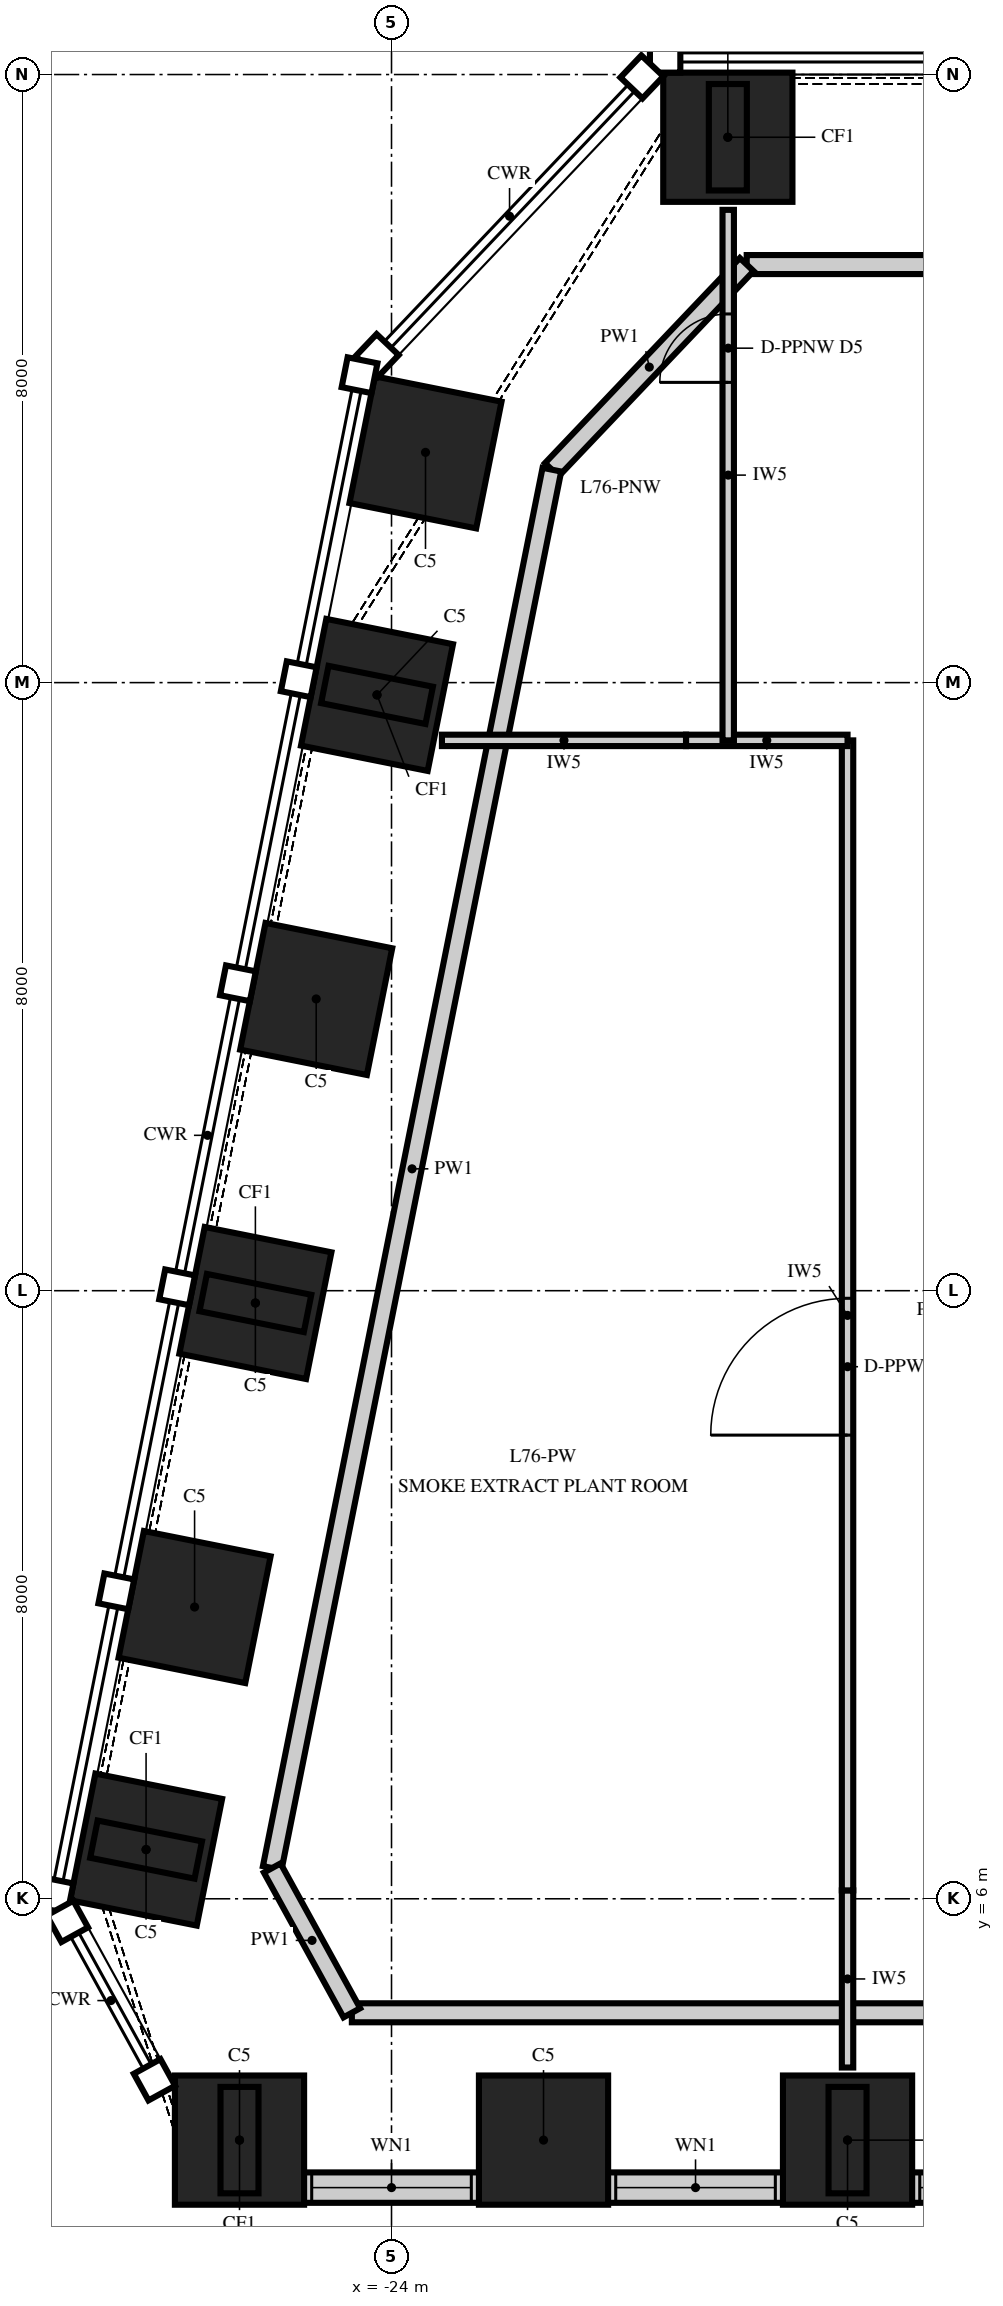
"""IFC4 building model, lengths in metres.
Left out: names, types, materials, properties, quantities, classifications, styles, units other than length and angle.
Written with IfcOpenShell. Run it as: python <this file> out.ifc"""

import sys

from ifc_helpers import new_model, si_unit, direction, frame, frame_2d, origin, origin_2d, place, context, subcontext, project, spatial, rectangle, hollow_rectangle, extrude, element, fill, save


model = new_model("IFC4")
c1 = context("Model", 3, precision=1e-05, world=origin(), true_north=direction((0.0, 1.0)))
c2 = subcontext(c1, "Body", "Model", "MODEL_VIEW")
j1 = project(units=[si_unit("LENGTHUNIT", "METRE"), si_unit("PLANEANGLEUNIT", "RADIAN")], contexts=[c1])
p1 = place(None, origin())
s1 = spatial("IfcSite", under=j1, at=p1, CompositionType="ELEMENT")
p2 = place(p1, origin())
s2 = spatial("IfcBuilding", under=s1, at=p2, CompositionType="ELEMENT")
p3 = place(p2, frame((0.0, 0.0, 324.0)))
s3 = spatial("IfcBuildingStorey", under=s2, at=p3, CompositionType="ELEMENT", Elevation=324.0)
for number, where, z_axis, x_axis in (
    (1, (-26.0, 2.825, 0.0), (0.0, 0.0, 1.0), (1.0, 0.0, 0.0)),
    (2, (-22.0, 2.825, 0.0), (0.0, 0.0, 1.0), (1.0, 0.0, 0.0)),
    (3, (-18.0, 2.825, 0.0), (0.0, 0.0, 1.0), (1.0, 0.0, 0.0)),
    (4, (-19.575, 29.175, 0.0), (0.0, 0.0, 1.0), (-1.0, 0.0, 0.0)),
    (5, (-23.553, 25.029, 0.0), (0.0, 0.0, 1.0), (-0.196, -0.981, 0.0)),
    (6, (-24.191, 21.838, 0.0), (0.0, 0.0, 1.0), (-0.196, -0.981, 0.0)),
    (7, (-24.991, 17.838, 0.0), (0.0, 0.0, 1.0), (-0.196, -0.981, 0.0)),
    (8, (-25.791, 13.838, 0.0), (0.0, 0.0, 1.0), (-0.196, -0.981, 0.0)),
    (9, (-26.591, 9.838, 0.0), (0.0, 0.0, 1.0), (-0.196, -0.981, 0.0)),
    (10, (-27.229, 6.647, 0.0), (0.0, 0.0, 1.0), (-0.196, -0.981, 0.0)),
):
    element("IfcColumn", number, at=place(p3, frame(where, z_axis=z_axis, x_axis=x_axis)), inside=s3, PredefinedType="COLUMN", context=c2, shape_type="SweptSolid", body=[
        extrude(rectangle(XDim=1.7, YDim=1.7, at=origin_2d()), origin(), (0.0, 0.0, 1.0), 6.0),
    ])
for number, where, z_axis, x_axis in (
    (11, (-26.0, 2.825, 6.0), (0.0, 0.0, 1.0), (1.0, 0.0, 0.0)),
    (12, (-18.0, 2.825, 6.0), (0.0, 0.0, 1.0), (1.0, 0.0, 0.0)),
    (13, (-19.575, 29.175, 6.0), (0.0, 0.0, 1.0), (-1.0, 0.0, 0.0)),
    (14, (-24.191, 21.838, 6.0), (0.0, 0.0, 1.0), (-0.196, -0.981, 0.0)),
    (15, (-25.791, 13.838, 6.0), (0.0, 0.0, 1.0), (-0.196, -0.981, 0.0)),
    (16, (-27.229, 6.647, 6.0), (0.0, 0.0, 1.0), (-0.196, -0.981, 0.0)),
):
    element("IfcColumn", number, at=place(p3, frame(where, z_axis=z_axis, x_axis=x_axis)), inside=s3, PredefinedType="COLUMN", context=c2, shape_type="SweptSolid", body=[
        extrude(hollow_rectangle(XDim=0.5, YDim=1.4, WallThickness=0.04, at=origin_2d()), origin(), (0.0, 0.0, 1.0), 24.0),
    ])
p4 = place(p3, frame((-26.0, 2.2, 0.0), z_axis=(0.0, 0.0, 1.0), x_axis=(1.0, 0.0, 0.0)))
e17 = element("IfcWall", 17, at=p4, inside=s3, PredefinedType="SOLIDWALL", context=c2, shape_type="SweptSolid", body=[
    extrude(rectangle(XDim=52.0, YDim=0.4, at=frame_2d((26.0, 0.0))), origin(), (0.0, 0.0, 1.0), 4.0),
])
p5 = place(p4, frame((0.95, 0.0, 0.8)))
e18 = element("IfcOpeningElement", 18, at=p5, cuts=e17, PredefinedType="OPENING", context=c2, shape_type="SweptSolid", body=[
    extrude(rectangle(XDim=2.1, YDim=1.15, at=frame_2d((1.05, 0.575))), frame((0.0, 0.215, 0.0), z_axis=(0.0, -1.0, 0.0), x_axis=(1.0, 0.0, 0.0)), (0.0, 0.0, 1.0), 0.43),
])
p6 = place(p4, frame((4.95, 0.0, 0.8)))
e19 = element("IfcOpeningElement", 19, at=p6, cuts=e17, PredefinedType="OPENING", context=c2, shape_type="SweptSolid", body=[
    extrude(rectangle(XDim=2.1, YDim=1.15, at=frame_2d((1.05, 0.575))), frame((0.0, 0.215, 0.0), z_axis=(0.0, -1.0, 0.0), x_axis=(1.0, 0.0, 0.0)), (0.0, 0.0, 1.0), 0.43),
])
p7 = place(p4, frame((8.95, 0.0, 0.8)))
e20 = element("IfcOpeningElement", 20, at=p7, cuts=e17, PredefinedType="OPENING", context=c2, shape_type="SweptSolid", body=[
    extrude(rectangle(XDim=2.1, YDim=1.15, at=frame_2d((1.05, 0.575))), frame((0.0, 0.215, 0.0), z_axis=(0.0, -1.0, 0.0), x_axis=(1.0, 0.0, 0.0)), (0.0, 0.0, 1.0), 0.43),
])
p8 = place(p4, frame((12.95, 0.0, 0.8)))
e21 = element("IfcOpeningElement", 21, at=p8, cuts=e17, PredefinedType="OPENING", context=c2, shape_type="SweptSolid", body=[
    extrude(rectangle(XDim=2.1, YDim=1.15, at=frame_2d((1.05, 0.575))), frame((0.0, 0.215, 0.0), z_axis=(0.0, -1.0, 0.0), x_axis=(1.0, 0.0, 0.0)), (0.0, 0.0, 1.0), 0.43),
])
p9 = place(p4, frame((16.95, 0.0, 0.8)))
e22 = element("IfcOpeningElement", 22, at=p9, cuts=e17, PredefinedType="OPENING", context=c2, shape_type="SweptSolid", body=[
    extrude(rectangle(XDim=2.1, YDim=1.15, at=frame_2d((1.05, 0.575))), frame((0.0, 0.215, 0.0), z_axis=(0.0, -1.0, 0.0), x_axis=(1.0, 0.0, 0.0)), (0.0, 0.0, 1.0), 0.43),
])
p10 = place(p4, frame((20.95, 0.0, 0.8)))
e23 = element("IfcOpeningElement", 23, at=p10, cuts=e17, PredefinedType="OPENING", context=c2, shape_type="SweptSolid", body=[
    extrude(rectangle(XDim=2.1, YDim=1.15, at=frame_2d((1.05, 0.575))), frame((0.0, 0.215, 0.0), z_axis=(0.0, -1.0, 0.0), x_axis=(1.0, 0.0, 0.0)), (0.0, 0.0, 1.0), 0.43),
])
p11 = place(p4, frame((24.95, 0.0, 0.8)))
e24 = element("IfcOpeningElement", 24, at=p11, cuts=e17, PredefinedType="OPENING", context=c2, shape_type="SweptSolid", body=[
    extrude(rectangle(XDim=2.1, YDim=1.15, at=frame_2d((1.05, 0.575))), frame((0.0, 0.215, 0.0), z_axis=(0.0, -1.0, 0.0), x_axis=(1.0, 0.0, 0.0)), (0.0, 0.0, 1.0), 0.43),
])
p12 = place(p4, frame((28.95, 0.0, 0.8)))
e25 = element("IfcOpeningElement", 25, at=p12, cuts=e17, PredefinedType="OPENING", context=c2, shape_type="SweptSolid", body=[
    extrude(rectangle(XDim=2.1, YDim=1.15, at=frame_2d((1.05, 0.575))), frame((0.0, 0.215, 0.0), z_axis=(0.0, -1.0, 0.0), x_axis=(1.0, 0.0, 0.0)), (0.0, 0.0, 1.0), 0.43),
])
p13 = place(p4, frame((32.95, 0.0, 0.8)))
e26 = element("IfcOpeningElement", 26, at=p13, cuts=e17, PredefinedType="OPENING", context=c2, shape_type="SweptSolid", body=[
    extrude(rectangle(XDim=2.1, YDim=1.15, at=frame_2d((1.05, 0.575))), frame((0.0, 0.215, 0.0), z_axis=(0.0, -1.0, 0.0), x_axis=(1.0, 0.0, 0.0)), (0.0, 0.0, 1.0), 0.43),
])
p14 = place(p4, frame((36.95, 0.0, 0.8)))
e27 = element("IfcOpeningElement", 27, at=p14, cuts=e17, PredefinedType="OPENING", context=c2, shape_type="SweptSolid", body=[
    extrude(rectangle(XDim=2.1, YDim=1.15, at=frame_2d((1.05, 0.575))), frame((0.0, 0.215, 0.0), z_axis=(0.0, -1.0, 0.0), x_axis=(1.0, 0.0, 0.0)), (0.0, 0.0, 1.0), 0.43),
])
p15 = place(p4, frame((40.95, 0.0, 0.8)))
e28 = element("IfcOpeningElement", 28, at=p15, cuts=e17, PredefinedType="OPENING", context=c2, shape_type="SweptSolid", body=[
    extrude(rectangle(XDim=2.1, YDim=1.15, at=frame_2d((1.05, 0.575))), frame((0.0, 0.215, 0.0), z_axis=(0.0, -1.0, 0.0), x_axis=(1.0, 0.0, 0.0)), (0.0, 0.0, 1.0), 0.43),
])
p16 = place(p4, frame((44.95, 0.0, 0.8)))
e29 = element("IfcOpeningElement", 29, at=p16, cuts=e17, PredefinedType="OPENING", context=c2, shape_type="SweptSolid", body=[
    extrude(rectangle(XDim=2.1, YDim=1.15, at=frame_2d((1.05, 0.575))), frame((0.0, 0.215, 0.0), z_axis=(0.0, -1.0, 0.0), x_axis=(1.0, 0.0, 0.0)), (0.0, 0.0, 1.0), 0.43),
])
p17 = place(p4, frame((48.95, 0.0, 0.8)))
e30 = element("IfcOpeningElement", 30, at=p17, cuts=e17, PredefinedType="OPENING", context=c2, shape_type="SweptSolid", body=[
    extrude(rectangle(XDim=2.1, YDim=1.15, at=frame_2d((1.05, 0.575))), frame((0.0, 0.215, 0.0), z_axis=(0.0, -1.0, 0.0), x_axis=(1.0, 0.0, 0.0)), (0.0, 0.0, 1.0), 0.43),
])
p18 = place(p3, frame((-24.522, 4.5, 6.0), z_axis=(0.0, 0.0, 1.0), x_axis=(1.0, 0.0, 0.0)))
e31 = element("IfcWall", 31, at=p18, inside=s3, PredefinedType="PARAPET", context=c2, shape_type="SweptSolid", body=[
    extrude(rectangle(XDim=49.043, YDim=0.25, at=frame_2d((24.522, 0.0))), origin(), (0.0, 0.0, 1.0), 1.1),
])
p19 = place(p3, frame((19.327, 27.5, 6.0), z_axis=(0.0, 0.0, 1.0), x_axis=(-1.0, 0.0, 0.0)))
e32 = element("IfcWall", 32, at=p19, inside=s3, PredefinedType="PARAPET", context=c2, shape_type="SweptSolid", body=[
    extrude(rectangle(XDim=38.653, YDim=0.25, at=frame_2d((19.327, 0.0))), origin(), (0.0, 0.0, 1.0), 1.1),
])
p20 = place(p3, frame((-19.327, 27.5, 6.0), z_axis=(0.0, 0.0, 1.0), x_axis=(-0.688770149305, -0.724979780012, 0.0)))
e33 = element("IfcWall", 33, at=p20, inside=s3, PredefinedType="PARAPET", context=c2, shape_type="SweptSolid", body=[
    extrude(rectangle(XDim=3.722, YDim=0.25, at=frame_2d((1.861, 0.0))), origin(), (0.0, 0.0, 1.0), 1.1),
])
p21 = place(p3, frame((-21.89, 24.802, 6.0), z_axis=(0.0, 0.0, 1.0), x_axis=(-0.196118637634, -0.980580175188, 0.0)))
e34 = element("IfcWall", 34, at=p21, inside=s3, PredefinedType="PARAPET", context=c2, shape_type="SweptSolid", body=[
    extrude(rectangle(XDim=18.761, YDim=0.25, at=frame_2d((9.381, 0.0))), origin(), (0.0, 0.0, 1.0), 1.1),
])
p22 = place(p3, frame((-25.57, 6.405, 6.0), z_axis=(0.0, 0.0, 1.0), x_axis=(0.481996345575, -0.876173226509, 0.0)))
e35 = element("IfcWall", 35, at=p22, inside=s3, PredefinedType="PARAPET", context=c2, shape_type="SweptSolid", body=[
    extrude(rectangle(XDim=2.174, YDim=0.25, at=frame_2d((1.087, 0.0))), origin(), (0.0, 0.0, 1.0), 1.1),
])
p23 = place(p3, frame((-18.0, 3.78, 0.0), z_axis=(0.0, 0.0, 1.0), x_axis=(0.0, 1.0, 0.0)))
e36 = element("IfcWall", 36, at=p23, inside=s3, PredefinedType="PARTITIONING", context=c2, shape_type="SweptSolid", body=[
    extrude(rectangle(XDim=2.33, YDim=0.15, at=frame_2d((1.165, 0.0))), origin(), (0.0, 0.0, 1.0), 5.13),
])
p24 = place(p3, frame((-18.0, 6.11, 0.0), z_axis=(0.0, 0.0, 1.0), x_axis=(0.0, 1.0, 0.0)))
e37 = element("IfcWall", 37, at=p24, inside=s3, PredefinedType="PARTITIONING", context=c2, shape_type="SweptSolid", body=[
    extrude(rectangle(XDim=15.13, YDim=0.15, at=frame_2d((7.565, 0.0))), origin(), (0.0, 0.0, 1.0), 5.75),
])
p25 = place(p24, frame((5.99, 0.0, 0.0)))
e38 = element("IfcOpeningElement", 38, at=p25, cuts=e37, PredefinedType="OPENING", context=c2, shape_type="SweptSolid", body=[
    extrude(rectangle(XDim=1.8, YDim=2.4, at=frame_2d((0.9, 1.2))), frame((0.0, 0.09, 0.0), z_axis=(0.0, -1.0, 0.0), x_axis=(1.0, 0.0, 0.0)), (0.0, 0.0, 1.0), 0.18),
])
p26 = place(p3, frame((-18.0, 21.24, 0.0), z_axis=(0.0, 0.0, 1.0), x_axis=(-1.0, 0.0, 0.0)))
e39 = element("IfcWall", 39, at=p26, inside=s3, PredefinedType="PARTITIONING", context=c2, shape_type="SweptSolid", body=[
    extrude(rectangle(XDim=2.125, YDim=0.15, at=frame_2d((1.062, 0.0))), origin(), (0.0, 0.0, 1.0), 5.13),
])
p27 = place(p3, frame((-20.125, 21.24, 0.0), z_axis=(0.0, 0.0, 1.0), x_axis=(-1.0, 0.0, 0.0)))
e40 = element("IfcWall", 40, at=p27, inside=s3, PredefinedType="PARTITIONING", context=c2, shape_type="SweptSolid", body=[
    extrude(rectangle(XDim=3.211, YDim=0.15, at=frame_2d((1.606, 0.0))), origin(), (0.0, 0.0, 1.0), 5.75),
])
p28 = place(p3, frame((-19.57, 21.24, 0.0), z_axis=(0.0, 0.0, 1.0), x_axis=(0.0, 1.0, 0.0)))
e41 = element("IfcWall", 41, at=p28, inside=s3, PredefinedType="PARTITIONING", context=c2, shape_type="SweptSolid", body=[
    extrude(rectangle(XDim=6.98, YDim=0.15, at=frame_2d((3.49, 0.0))), origin(), (0.0, 0.0, 1.0), 5.318),
])
p29 = place(p28, frame((4.71, 0.0, 0.0)))
e42 = element("IfcOpeningElement", 42, at=p29, cuts=e41, PredefinedType="OPENING", context=c2, shape_type="SweptSolid", body=[
    extrude(rectangle(XDim=0.9, YDim=2.1, at=frame_2d((0.45, 1.05))), frame((0.0, 0.09, 0.0), z_axis=(0.0, -1.0, 0.0), x_axis=(1.0, 0.0, 0.0)), (0.0, 0.0, 1.0), 0.18),
])
p30 = place(p5, origin())
e43 = element("IfcWindow", 43, at=p30, inside=s3, PartitioningType="SINGLE_PANEL", PredefinedType="WINDOW", context=c2, shape_type="SweptSolid", body=[
    extrude(rectangle(XDim=2.1, YDim=1.15, at=frame_2d((1.05, 0.575))), frame((0.0, 0.03, 0.0), z_axis=(0.0, -1.0, 0.0), x_axis=(1.0, 0.0, 0.0)), (0.0, 0.0, 1.0), 0.06),
])
fill(e18, e43)
p31 = place(p6, origin())
e44 = element("IfcWindow", 44, at=p31, inside=s3, PartitioningType="SINGLE_PANEL", PredefinedType="WINDOW", context=c2, shape_type="SweptSolid", body=[
    extrude(rectangle(XDim=2.1, YDim=1.15, at=frame_2d((1.05, 0.575))), frame((0.0, 0.03, 0.0), z_axis=(0.0, -1.0, 0.0), x_axis=(1.0, 0.0, 0.0)), (0.0, 0.0, 1.0), 0.06),
])
fill(e19, e44)
p32 = place(p7, origin())
e45 = element("IfcWindow", 45, at=p32, inside=s3, PartitioningType="SINGLE_PANEL", PredefinedType="WINDOW", context=c2, shape_type="SweptSolid", body=[
    extrude(rectangle(XDim=2.1, YDim=1.15, at=frame_2d((1.05, 0.575))), frame((0.0, 0.03, 0.0), z_axis=(0.0, -1.0, 0.0), x_axis=(1.0, 0.0, 0.0)), (0.0, 0.0, 1.0), 0.06),
])
fill(e20, e45)
p33 = place(p25, origin())
e46 = element("IfcDoor", 46, at=p33, inside=s3, OperationType="DOUBLE_DOOR_SINGLE_SWING", PredefinedType="DOOR", context=c2, shape_type="SweptSolid", body=[
    extrude(rectangle(XDim=1.8, YDim=2.4, at=frame_2d((0.9, 1.2))), frame((0.0, 0.075, 0.0), z_axis=(0.0, -1.0, 0.0), x_axis=(1.0, 0.0, 0.0)), (0.0, 0.0, 1.0), 0.149),
])
fill(e38, e46)
p34 = place(p29, origin())
e47 = element("IfcDoor", 47, at=p34, inside=s3, OperationType="SINGLE_SWING_LEFT", PredefinedType="DOOR", context=c2, shape_type="SweptSolid", body=[
    extrude(rectangle(XDim=0.9, YDim=2.1, at=frame_2d((0.45, 1.05))), frame((0.0, 0.075, 0.0), z_axis=(0.0, -1.0, 0.0), x_axis=(1.0, 0.0, 0.0)), (0.0, 0.0, 1.0), 0.149),
])
fill(e42, e47)
save(model, sys.argv[1])
